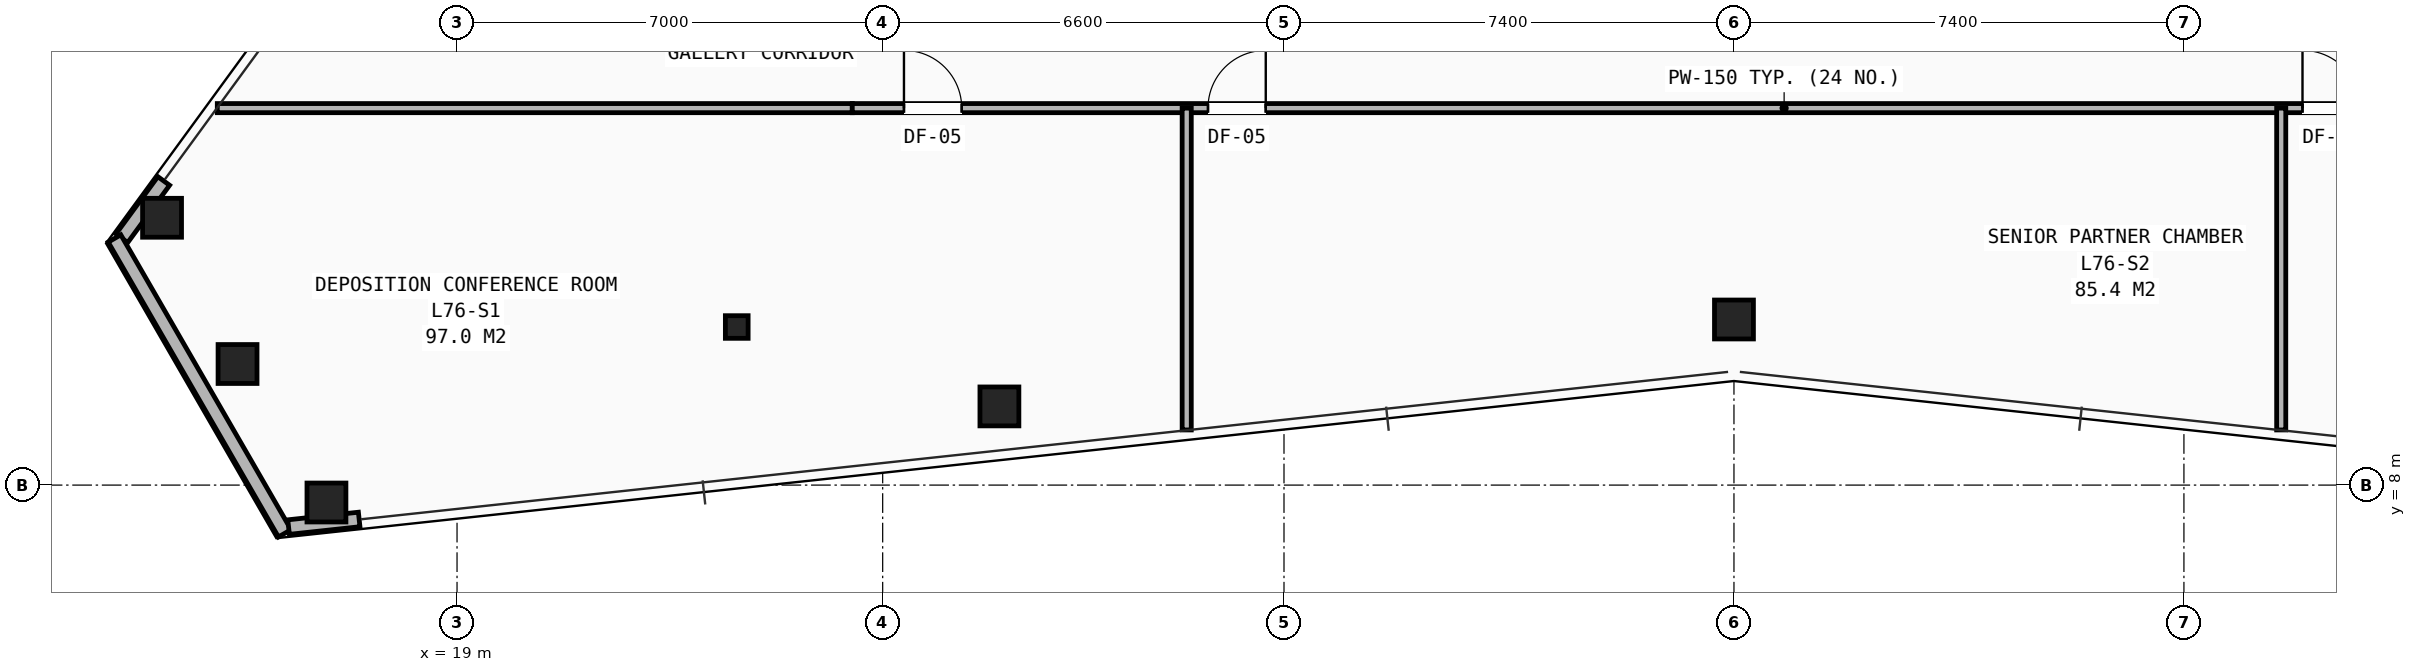
"""IFC4 building model, lengths in metres.
Left out: names, types, materials, properties, quantities, classifications, styles, units other than length and angle.
Written with IfcOpenShell. Run it as: python <this file> out.ifc"""

import sys

from ifc_helpers import new_model, si_unit, direction, frame, frame_2d, origin, origin_2d, place, context, subcontext, project, spatial, rectangle, hollow_rectangle, i_section, extrude, element, fill, save


model = new_model("IFC4")
c1 = context("Model", 3, precision=1e-05, world=origin(), true_north=direction((0.0, 1.0)))
c2 = subcontext(c1, "Body", "Model", "MODEL_VIEW")
j1 = project(units=[si_unit("LENGTHUNIT", "METRE"), si_unit("PLANEANGLEUNIT", "RADIAN")], contexts=[c1])
p1 = place(None, origin())
s1 = spatial("IfcSite", under=j1, at=p1, CompositionType="ELEMENT")
p2 = place(p1, origin())
s2 = spatial("IfcBuilding", under=s1, at=p2, CompositionType="ELEMENT")
p3 = place(p2, frame((0.0, 0.0, 269.0)))
s3 = spatial("IfcBuildingStorey", under=s2, at=p3, CompositionType="ELEMENT", Elevation=269.0)
p4 = place(p3, frame((23.6, 10.6, 0.0), z_axis=(0.0, 0.0, 1.0), x_axis=(1.0, 0.0, 0.0)))
e1 = element("IfcColumn", 1, at=p4, inside=s3, PredefinedType="COLUMN", context=c2, shape_type="SweptSolid", body=[
    extrude(i_section(OverallWidth=0.374, OverallDepth=0.372, WebThickness=0.016, FlangeThickness=0.026, at=origin_2d()), origin(), (0.0, 0.0, 1.0), 3.5),
])
for number, where, z_axis, x_axis in (
    (2, (14.149, 12.397, 0.0), (0.0, 0.0, 1.0), (1.0, 0.0, 0.0)),
    (3, (15.39, 9.991, 0.0), (0.0, 0.0, 1.0), (1.0, 0.0, 0.0)),
    (4, (16.852, 7.714, 0.0), (0.0, 0.0, 1.0), (1.0, 0.0, 0.0)),
    (5, (27.92, 9.294, 0.0), (0.0, 0.0, 1.0), (1.0, 0.0, 0.0)),
    (6, (40.0, 10.724, 0.0), (0.0, 0.0, 1.0), (1.0, 0.0, 0.0)),
):
    element("IfcColumn", number, at=place(p3, frame(where, z_axis=z_axis, x_axis=x_axis)), inside=s3, PredefinedType="COLUMN", context=c2, shape_type="SweptSolid", body=[
        extrude(hollow_rectangle(XDim=0.64, YDim=0.64, WallThickness=0.045, at=origin_2d()), origin(), (0.0, 0.0, 1.0), 3.5),
    ])
p5 = place(p3, frame((14.176, 13.002, 0.0), z_axis=(0.0, 0.0, 1.0), x_axis=(-0.589948424207, -0.807440930827, 0.0)))
e7 = element("IfcWall", 7, at=p5, inside=s3, PredefinedType="SHEAR", context=c2, shape_type="SweptSolid", body=[
    extrude(rectangle(XDim=1.167, YDim=0.24, at=frame_2d((0.584, 0.0))), origin(), (0.0, 0.0, 1.0), 2.623),
])
p6 = place(p3, frame((16.167, 7.207, 0.0), z_axis=(0.0, 0.0, 1.0), x_axis=(-0.49999793692, 0.866026594901, 0.0)))
e8 = element("IfcWall", 8, at=p6, inside=s3, PredefinedType="SHEAR", context=c2, shape_type="SweptSolid", body=[
    extrude(rectangle(XDim=5.6, YDim=0.24, at=frame_2d((2.8, 0.0))), origin(), (0.0, 0.0, 1.0), 2.623),
])
p7 = place(p3, frame((16.23, 7.309, 0.0), z_axis=(0.0, 0.0, 1.0), x_axis=(0.994228168344, 0.107286295827, 0.0)))
e9 = element("IfcWall", 9, at=p7, inside=s3, PredefinedType="SHEAR", context=c2, shape_type="SweptSolid", body=[
    extrude(rectangle(XDim=1.167, YDim=0.24, at=frame_2d((0.584, 0.0))), origin(), (0.0, 0.0, 1.0), 2.623),
])
p8 = place(p3, frame((15.057, 14.2, 0.0), z_axis=(0.0, 0.0, 1.0), x_axis=(1.0, 0.0, 0.0)))
e10 = element("IfcWall", 10, at=p8, inside=s3, PredefinedType="PARTITIONING", context=c2, shape_type="SweptSolid", body=[
    extrude(rectangle(XDim=10.443, YDim=0.15, at=frame_2d((5.221, 0.0))), origin(), (0.0, 0.0, 1.0), 2.292),
])
p9 = place(p3, frame((25.5, 14.2, 0.0), z_axis=(0.0, 0.0, 1.0), x_axis=(1.0, 0.0, 0.0)))
e11 = element("IfcWall", 11, at=p9, inside=s3, PredefinedType="PARTITIONING", context=c2, shape_type="SweptSolid", body=[
    extrude(rectangle(XDim=29.0, YDim=0.15, at=frame_2d((14.5, 0.0))), origin(), (0.0, 0.0, 1.0), 2.292),
])
p10 = place(p9, frame((0.85, 0.0, 0.0)))
e12 = element("IfcOpeningElement", 12, at=p10, cuts=e11, PredefinedType="OPENING", context=c2, shape_type="SweptSolid", body=[
    extrude(rectangle(XDim=0.95, YDim=2.1, at=frame_2d((0.475, 1.05))), frame((0.0, 0.085, 0.0), z_axis=(0.0, -1.0, 0.0), x_axis=(1.0, 0.0, 0.0)), (0.0, 0.0, 1.0), 0.17),
])
p11 = place(p9, frame((5.85, 0.0, 0.0)))
e13 = element("IfcOpeningElement", 13, at=p11, cuts=e11, PredefinedType="OPENING", context=c2, shape_type="SweptSolid", body=[
    extrude(rectangle(XDim=0.95, YDim=2.1, at=frame_2d((0.475, 1.05))), frame((0.0, 0.085, 0.0), z_axis=(0.0, -1.0, 0.0), x_axis=(1.0, 0.0, 0.0)), (0.0, 0.0, 1.0), 0.17),
])
p12 = place(p9, frame((23.85, 0.0, 0.0)))
e14 = element("IfcOpeningElement", 14, at=p12, cuts=e11, PredefinedType="OPENING", context=c2, shape_type="SweptSolid", body=[
    extrude(rectangle(XDim=0.95, YDim=2.1, at=frame_2d((0.475, 1.05))), frame((0.0, 0.085, 0.0), z_axis=(0.0, -1.0, 0.0), x_axis=(1.0, 0.0, 0.0)), (0.0, 0.0, 1.0), 0.17),
])
for number, where, z_axis, x_axis in (
    (15, (31.0, 8.907, 0.0), (0.0, 0.0, 1.0), (0.0, 1.0, 0.0)),
    (16, (49.0, 8.907, 0.0), (0.0, 0.0, 1.0), (0.0, 1.0, 0.0)),
):
    element("IfcWall", number, at=place(p3, frame(where, z_axis=z_axis, x_axis=x_axis)), inside=s3, PredefinedType="PARTITIONING", context=c2, shape_type="SweptSolid", body=[
        extrude(rectangle(XDim=5.293, YDim=0.15, at=frame_2d((2.646, 0.0))), origin(), (0.0, 0.0, 1.0), 2.628),
    ])
p13 = place(p10, origin())
e17 = element("IfcDoor", 17, at=p13, inside=s3, OperationType="SINGLE_SWING_LEFT", PredefinedType="DOOR", context=c2, shape_type="SweptSolid", body=[
    extrude(rectangle(XDim=0.95, YDim=2.1, at=frame_2d((0.475, 1.05))), frame((0.0, 0.025, 0.0), z_axis=(0.0, -1.0, 0.0), x_axis=(1.0, 0.0, 0.0)), (0.0, 0.0, 1.0), 0.05),
])
fill(e12, e17)
p14 = place(p11, origin())
e18 = element("IfcDoor", 18, at=p14, inside=s3, OperationType="SINGLE_SWING_RIGHT", PredefinedType="DOOR", context=c2, shape_type="SweptSolid", body=[
    extrude(rectangle(XDim=0.95, YDim=2.1, at=frame_2d((0.475, 1.05))), frame((0.0, 0.025, 0.0), z_axis=(0.0, -1.0, 0.0), x_axis=(1.0, 0.0, 0.0)), (0.0, 0.0, 1.0), 0.05),
])
fill(e13, e18)
p15 = place(p12, origin())
e19 = element("IfcDoor", 19, at=p15, inside=s3, OperationType="SINGLE_SWING_LEFT", PredefinedType="DOOR", context=c2, shape_type="SweptSolid", body=[
    extrude(rectangle(XDim=0.95, YDim=2.1, at=frame_2d((0.475, 1.05))), frame((0.0, 0.025, 0.0), z_axis=(0.0, -1.0, 0.0), x_axis=(1.0, 0.0, 0.0)), (0.0, 0.0, 1.0), 0.05),
])
fill(e14, e19)
save(model, sys.argv[1])
